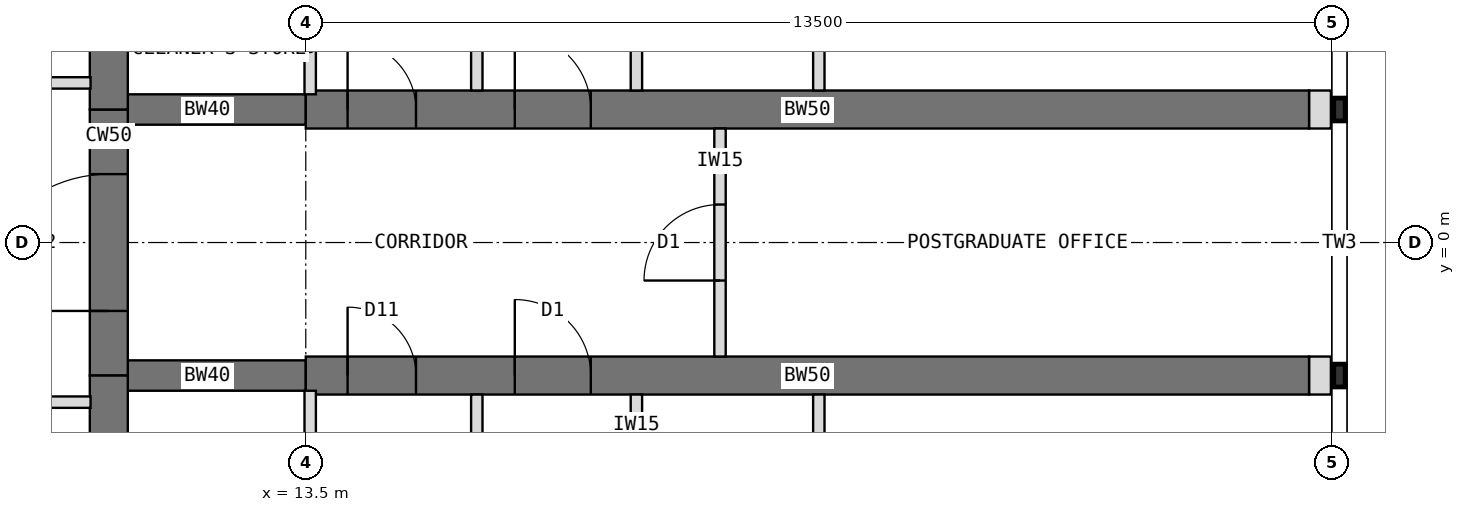
"""IFC4 building model, lengths in metres.
Left out: names, types, materials, properties, quantities, classifications, styles, units other than length and angle.
Written with IfcOpenShell. Run it as: python <this file> out.ifc"""

import sys

from ifc_helpers import new_model, si_unit, direction, frame, frame_2d, origin, place, context, subcontext, project, spatial, rectangle, extrude, element, fill, save


model = new_model("IFC4")
c1 = context("Model", 3, precision=1e-05, world=origin(), true_north=direction((0.0, 1.0)))
c2 = subcontext(c1, "Body", "Model", "MODEL_VIEW")
j1 = project(units=[si_unit("LENGTHUNIT", "METRE"), si_unit("PLANEANGLEUNIT", "RADIAN")], contexts=[c1])
p1 = place(None, origin())
s1 = spatial("IfcSite", under=j1, at=p1, CompositionType="ELEMENT")
p2 = place(p1, origin())
s2 = spatial("IfcBuilding", under=s1, at=p2, CompositionType="ELEMENT")
p3 = place(p2, frame((0.0, 0.0, 206.5)))
s3 = spatial("IfcBuildingStorey", under=s2, at=p3, CompositionType="ELEMENT", Elevation=206.5)
p4 = place(p3, frame((10.908, -6.298, 0.0), z_axis=(0.0, 0.0, 1.0), x_axis=(0.0, 1.0, 0.0)))
e1 = element("IfcWall", 1, at=p4, inside=s3, PredefinedType="SHEAR", context=c2, shape_type="SweptSolid", body=[
    extrude(rectangle(XDim=4.548, YDim=0.5, at=frame_2d((2.274, 0.0))), origin(), (0.0, 0.0, 1.0), 4.0),
])
p5 = place(p3, frame((10.908, -1.75, 0.0), z_axis=(0.0, 0.0, 1.0), x_axis=(0.0, 1.0, 0.0)))
e2 = element("IfcWall", 2, at=p5, inside=s3, PredefinedType="SHEAR", context=c2, shape_type="SweptSolid", body=[
    extrude(rectangle(XDim=3.5, YDim=0.5, at=frame_2d((1.75, 0.0))), origin(), (0.0, 0.0, 1.0), 4.0),
])
p6 = place(p5, frame((0.85, 0.0, 0.0)))
e3 = element("IfcOpeningElement", 3, at=p6, cuts=e2, PredefinedType="OPENING", context=c2, shape_type="SweptSolid", body=[
    extrude(rectangle(XDim=1.8, YDim=2.1, at=frame_2d((0.9, 1.05))), frame((0.0, 0.26, 0.0), z_axis=(0.0, -1.0, 0.0), x_axis=(1.0, 0.0, 0.0)), (0.0, 0.0, 1.0), 0.52),
])
p7 = place(p3, frame((10.908, 1.75, 0.0), z_axis=(0.0, 0.0, 1.0), x_axis=(0.0, 1.0, 0.0)))
e4 = element("IfcWall", 4, at=p7, inside=s3, PredefinedType="SHEAR", context=c2, shape_type="SweptSolid", body=[
    extrude(rectangle(XDim=4.548, YDim=0.5, at=frame_2d((2.274, 0.0))), origin(), (0.0, 0.0, 1.0), 4.0),
])
p8 = place(p3, frame((10.908, 1.75, 0.0), z_axis=(0.0, 0.0, 1.0), x_axis=(1.0, 0.0, 0.0)))
e5 = element("IfcWall", 5, at=p8, inside=s3, PredefinedType="SHEAR", context=c2, shape_type="SweptSolid", body=[
    extrude(rectangle(XDim=2.592, YDim=0.4, at=frame_2d((1.296, 0.0))), origin(), (0.0, 0.0, 1.0), 4.0),
])
p9 = place(p3, frame((13.5, 1.75, 0.0), z_axis=(0.0, 0.0, 1.0), x_axis=(1.0, 0.0, 0.0)))
e6 = element("IfcWall", 6, at=p9, inside=s3, PredefinedType="SHEAR", context=c2, shape_type="SweptSolid", body=[
    extrude(rectangle(XDim=13.2, YDim=0.5, at=frame_2d((6.6, 0.0))), origin(), (0.0, 0.0, 1.0), 4.0),
])
p10 = place(p9, frame((0.55, 0.0, 0.0)))
e7 = element("IfcOpeningElement", 7, at=p10, cuts=e6, PredefinedType="OPENING", context=c2, shape_type="SweptSolid", body=[
    extrude(rectangle(XDim=0.9, YDim=2.1, at=frame_2d((0.45, 1.05))), frame((0.0, 0.26, 0.0), z_axis=(0.0, -1.0, 0.0), x_axis=(1.0, 0.0, 0.0)), (0.0, 0.0, 1.0), 0.52),
])
p11 = place(p9, frame((2.75, 0.0, 0.0)))
e8 = element("IfcOpeningElement", 8, at=p11, cuts=e6, PredefinedType="OPENING", context=c2, shape_type="SweptSolid", body=[
    extrude(rectangle(XDim=1.0, YDim=2.1, at=frame_2d((0.5, 1.05))), frame((0.0, 0.26, 0.0), z_axis=(0.0, -1.0, 0.0), x_axis=(1.0, 0.0, 0.0)), (0.0, 0.0, 1.0), 0.52),
])
p12 = place(p3, frame((10.908, -1.75, 0.0), z_axis=(0.0, 0.0, 1.0), x_axis=(1.0, 0.0, 0.0)))
e9 = element("IfcWall", 9, at=p12, inside=s3, PredefinedType="SHEAR", context=c2, shape_type="SweptSolid", body=[
    extrude(rectangle(XDim=2.592, YDim=0.4, at=frame_2d((1.296, 0.0))), origin(), (0.0, 0.0, 1.0), 4.0),
])
p13 = place(p3, frame((13.5, -1.75, 0.0), z_axis=(0.0, 0.0, 1.0), x_axis=(1.0, 0.0, 0.0)))
e10 = element("IfcWall", 10, at=p13, inside=s3, PredefinedType="SHEAR", context=c2, shape_type="SweptSolid", body=[
    extrude(rectangle(XDim=13.2, YDim=0.5, at=frame_2d((6.6, 0.0))), origin(), (0.0, 0.0, 1.0), 4.0),
])
p14 = place(p13, frame((0.55, 0.0, 0.0)))
e11 = element("IfcOpeningElement", 11, at=p14, cuts=e10, PredefinedType="OPENING", context=c2, shape_type="SweptSolid", body=[
    extrude(rectangle(XDim=0.9, YDim=2.1, at=frame_2d((0.45, 1.05))), frame((0.0, 0.26, 0.0), z_axis=(0.0, -1.0, 0.0), x_axis=(1.0, 0.0, 0.0)), (0.0, 0.0, 1.0), 0.52),
])
p15 = place(p13, frame((2.75, 0.0, 0.0)))
e12 = element("IfcOpeningElement", 12, at=p15, cuts=e10, PredefinedType="OPENING", context=c2, shape_type="SweptSolid", body=[
    extrude(rectangle(XDim=1.0, YDim=2.1, at=frame_2d((0.5, 1.05))), frame((0.0, 0.26, 0.0), z_axis=(0.0, -1.0, 0.0), x_axis=(1.0, 0.0, 0.0)), (0.0, 0.0, 1.0), 0.52),
])
for number, where, z_axis, x_axis in (
    (13, (26.7, 1.75, 0.0), (0.0, 0.0, 1.0), (1.0, 0.0, 0.0)),
    (14, (26.7, -1.75, 0.0), (0.0, 0.0, 1.0), (1.0, 0.0, 0.0)),
):
    element("IfcWall", number, at=place(p3, frame(where, z_axis=z_axis, x_axis=x_axis)), inside=s3, PredefinedType="PARTITIONING", context=c2, shape_type="SweptSolid", body=[
        extrude(rectangle(XDim=0.288, YDim=0.5, at=frame_2d((0.144, 0.0))), origin(), (0.0, 0.0, 1.0), 3.8),
    ])
p16 = place(p3, frame((15.75, 2.0, 0.0), z_axis=(0.0, 0.0, 1.0), x_axis=(0.0, 1.0, 0.0)))
e15 = element("IfcWall", 15, at=p16, inside=s3, PredefinedType="PARTITIONING", context=c2, shape_type="SweptSolid", body=[
    extrude(rectangle(XDim=4.75, YDim=0.15, at=frame_2d((2.375, 0.0))), origin(), (0.0, 0.0, 1.0), 3.8),
])
p17 = place(p3, frame((20.25, 2.0, 0.0), z_axis=(0.0, 0.0, 1.0), x_axis=(0.0, 1.0, 0.0)))
e16 = element("IfcWall", 16, at=p17, inside=s3, PredefinedType="PARTITIONING", context=c2, shape_type="SweptSolid", body=[
    extrude(rectangle(XDim=4.75, YDim=0.15, at=frame_2d((2.375, 0.0))), origin(), (0.0, 0.0, 1.0), 3.8),
])
p18 = place(p17, frame((3.35, 0.0, 0.0)))
e17 = element("IfcOpeningElement", 17, at=p18, cuts=e16, PredefinedType="OPENING", context=c2, shape_type="SweptSolid", body=[
    extrude(rectangle(XDim=1.0, YDim=2.1, at=frame_2d((0.5, 1.05))), frame((0.0, 0.085, 0.0), z_axis=(0.0, -1.0, 0.0), x_axis=(1.0, 0.0, 0.0)), (0.0, 0.0, 1.0), 0.17),
])
p19 = place(p3, frame((17.85, 2.0, 0.0), z_axis=(0.0, 0.0, 1.0), x_axis=(0.0, 1.0, 0.0)))
e18 = element("IfcWall", 18, at=p19, inside=s3, PredefinedType="PARTITIONING", context=c2, shape_type="SweptSolid", body=[
    extrude(rectangle(XDim=2.4, YDim=0.15, at=frame_2d((1.2, 0.0))), origin(), (0.0, 0.0, 1.0), 3.8),
])
p20 = place(p19, frame((0.7, 0.0, 0.0)))
e19 = element("IfcOpeningElement", 19, at=p20, cuts=e18, PredefinedType="OPENING", context=c2, shape_type="SweptSolid", body=[
    extrude(rectangle(XDim=1.0, YDim=2.1, at=frame_2d((0.5, 1.05))), frame((0.0, 0.085, 0.0), z_axis=(0.0, -1.0, 0.0), x_axis=(1.0, 0.0, 0.0)), (0.0, 0.0, 1.0), 0.17),
])
p21 = place(p3, frame((13.558, 1.95, 0.0), z_axis=(0.0, 0.0, 1.0), x_axis=(0.0, 1.0, 0.0)))
e20 = element("IfcWall", 20, at=p21, inside=s3, PredefinedType="PARTITIONING", context=c2, shape_type="SweptSolid", body=[
    extrude(rectangle(XDim=1.2, YDim=0.15, at=frame_2d((0.6, 0.0))), origin(), (0.0, 0.0, 1.0), 3.267),
])
p22 = place(p3, frame((15.75, -2.0, 0.0), z_axis=(0.0, 0.0, 1.0), x_axis=(0.0, -1.0, 0.0)))
e21 = element("IfcWall", 21, at=p22, inside=s3, PredefinedType="PARTITIONING", context=c2, shape_type="SweptSolid", body=[
    extrude(rectangle(XDim=4.75, YDim=0.15, at=frame_2d((2.375, 0.0))), origin(), (0.0, 0.0, 1.0), 3.8),
])
p23 = place(p3, frame((20.25, -2.0, 0.0), z_axis=(0.0, 0.0, 1.0), x_axis=(0.0, -1.0, 0.0)))
e22 = element("IfcWall", 22, at=p23, inside=s3, PredefinedType="PARTITIONING", context=c2, shape_type="SweptSolid", body=[
    extrude(rectangle(XDim=4.75, YDim=0.15, at=frame_2d((2.375, 0.0))), origin(), (0.0, 0.0, 1.0), 3.8),
])
p24 = place(p23, frame((3.35, 0.0, 0.0)))
e23 = element("IfcOpeningElement", 23, at=p24, cuts=e22, PredefinedType="OPENING", context=c2, shape_type="SweptSolid", body=[
    extrude(rectangle(XDim=1.0, YDim=2.1, at=frame_2d((0.5, 1.05))), frame((0.0, 0.085, 0.0), z_axis=(0.0, -1.0, 0.0), x_axis=(1.0, 0.0, 0.0)), (0.0, 0.0, 1.0), 0.17),
])
p25 = place(p3, frame((17.85, -2.0, 0.0), z_axis=(0.0, 0.0, 1.0), x_axis=(0.0, -1.0, 0.0)))
e24 = element("IfcWall", 24, at=p25, inside=s3, PredefinedType="PARTITIONING", context=c2, shape_type="SweptSolid", body=[
    extrude(rectangle(XDim=2.4, YDim=0.15, at=frame_2d((1.2, 0.0))), origin(), (0.0, 0.0, 1.0), 3.8),
])
p26 = place(p25, frame((0.7, 0.0, 0.0)))
e25 = element("IfcOpeningElement", 25, at=p26, cuts=e24, PredefinedType="OPENING", context=c2, shape_type="SweptSolid", body=[
    extrude(rectangle(XDim=1.0, YDim=2.1, at=frame_2d((0.5, 1.05))), frame((0.0, 0.085, 0.0), z_axis=(0.0, -1.0, 0.0), x_axis=(1.0, 0.0, 0.0)), (0.0, 0.0, 1.0), 0.17),
])
p27 = place(p3, frame((13.558, -1.95, 0.0), z_axis=(0.0, 0.0, 1.0), x_axis=(0.0, -1.0, 0.0)))
e26 = element("IfcWall", 26, at=p27, inside=s3, PredefinedType="PARTITIONING", context=c2, shape_type="SweptSolid", body=[
    extrude(rectangle(XDim=3.2, YDim=0.15, at=frame_2d((1.6, 0.0))), origin(), (0.0, 0.0, 1.0), 3.267),
])
p28 = place(p3, frame((6.143, 2.1, 0.0), z_axis=(0.0, 0.0, 1.0), x_axis=(1.0, 0.0, 0.0)))
e27 = element("IfcWall", 27, at=p28, inside=s3, PredefinedType="PARTITIONING", context=c2, shape_type="SweptSolid", body=[
    extrude(rectangle(XDim=4.526, YDim=0.15, at=frame_2d((2.263, 0.0))), origin(), (0.0, 0.0, 1.0), 3.8),
])
p29 = place(p28, frame((0.858, 0.0, 0.0)))
e28 = element("IfcOpeningElement", 28, at=p29, cuts=e27, PredefinedType="OPENING", context=c2, shape_type="SweptSolid", body=[
    extrude(rectangle(XDim=1.0, YDim=2.1, at=frame_2d((0.5, 1.05))), frame((0.0, 0.085, 0.0), z_axis=(0.0, -1.0, 0.0), x_axis=(1.0, 0.0, 0.0)), (0.0, 0.0, 1.0), 0.17),
])
p30 = place(p3, frame((10.668, -2.1, 0.0), z_axis=(0.0, 0.0, 1.0), x_axis=(-1.0, 0.0, 0.0)))
e29 = element("IfcWall", 29, at=p30, inside=s3, PredefinedType="PARTITIONING", context=c2, shape_type="SweptSolid", body=[
    extrude(rectangle(XDim=4.526, YDim=0.15, at=frame_2d((2.263, 0.0))), origin(), (0.0, 0.0, 1.0), 3.8),
])
p31 = place(p30, frame((2.668, 0.0, 0.0)))
e30 = element("IfcOpeningElement", 30, at=p31, cuts=e29, PredefinedType="OPENING", context=c2, shape_type="SweptSolid", body=[
    extrude(rectangle(XDim=1.0, YDim=2.1, at=frame_2d((0.5, 1.05))), frame((0.0, 0.085, 0.0), z_axis=(0.0, -1.0, 0.0), x_axis=(1.0, 0.0, 0.0)), (0.0, 0.0, 1.0), 0.17),
])
p32 = place(p3, frame((18.95, -1.5, 0.0), z_axis=(0.0, 0.0, 1.0), x_axis=(0.0, 1.0, 0.0)))
e31 = element("IfcWall", 31, at=p32, inside=s3, PredefinedType="PARTITIONING", context=c2, shape_type="SweptSolid", body=[
    extrude(rectangle(XDim=3.0, YDim=0.15, at=frame_2d((1.5, 0.0))), origin(), (0.0, 0.0, 1.0), 3.8),
])
p33 = place(p32, frame((1.0, 0.0, 0.0)))
e32 = element("IfcOpeningElement", 32, at=p33, cuts=e31, PredefinedType="OPENING", context=c2, shape_type="SweptSolid", body=[
    extrude(rectangle(XDim=1.0, YDim=2.1, at=frame_2d((0.5, 1.05))), frame((0.0, 0.085, 0.0), z_axis=(0.0, -1.0, 0.0), x_axis=(1.0, 0.0, 0.0)), (0.0, 0.0, 1.0), 0.17),
])
p34 = place(p6, origin())
e33 = element("IfcDoor", 33, at=p34, inside=s3, OperationType="DOUBLE_DOOR_DOUBLE_SWING", PredefinedType="DOOR", context=c2, shape_type="SweptSolid", body=[
    extrude(rectangle(XDim=1.8, YDim=2.1, at=frame_2d((0.9, 1.05))), frame((0.0, 0.025, 0.0), z_axis=(0.0, -1.0, 0.0), x_axis=(1.0, 0.0, 0.0)), (0.0, 0.0, 1.0), 0.05),
])
fill(e3, e33)
p35 = place(p33, origin())
e34 = element("IfcDoor", 34, at=p35, inside=s3, OperationType="SINGLE_SWING_LEFT", PredefinedType="DOOR", context=c2, shape_type="SweptSolid", body=[
    extrude(rectangle(XDim=1.0, YDim=2.1, at=frame_2d((0.5, 1.05))), frame((0.0, 0.025, 0.0), z_axis=(0.0, -1.0, 0.0), x_axis=(1.0, 0.0, 0.0)), (0.0, 0.0, 1.0), 0.05),
])
fill(e32, e34)
p36 = place(p10, origin())
e35 = element("IfcDoor", 35, at=p36, inside=s3, OperationType="SINGLE_SWING_LEFT", PredefinedType="DOOR", context=c2, shape_type="SweptSolid", body=[
    extrude(rectangle(XDim=0.9, YDim=2.1, at=frame_2d((0.45, 1.05))), frame((0.0, 0.025, 0.0), z_axis=(0.0, -1.0, 0.0), x_axis=(1.0, 0.0, 0.0)), (0.0, 0.0, 1.0), 0.05),
])
fill(e7, e35)
p37 = place(p11, origin())
e36 = element("IfcDoor", 36, at=p37, inside=s3, OperationType="SINGLE_SWING_LEFT", PredefinedType="DOOR", context=c2, shape_type="SweptSolid", body=[
    extrude(rectangle(XDim=1.0, YDim=2.1, at=frame_2d((0.5, 1.05))), frame((0.0, 0.025, 0.0), z_axis=(0.0, -1.0, 0.0), x_axis=(1.0, 0.0, 0.0)), (0.0, 0.0, 1.0), 0.05),
])
fill(e8, e36)
p38 = place(p14, origin())
e37 = element("IfcDoor", 37, at=p38, inside=s3, OperationType="SINGLE_SWING_LEFT", PredefinedType="DOOR", context=c2, shape_type="SweptSolid", body=[
    extrude(rectangle(XDim=0.9, YDim=2.1, at=frame_2d((0.45, 1.05))), frame((0.0, 0.025, 0.0), z_axis=(0.0, -1.0, 0.0), x_axis=(1.0, 0.0, 0.0)), (0.0, 0.0, 1.0), 0.05),
])
fill(e11, e37)
p39 = place(p15, origin())
e38 = element("IfcDoor", 38, at=p39, inside=s3, OperationType="SINGLE_SWING_LEFT", PredefinedType="DOOR", context=c2, shape_type="SweptSolid", body=[
    extrude(rectangle(XDim=1.0, YDim=2.1, at=frame_2d((0.5, 1.05))), frame((0.0, 0.025, 0.0), z_axis=(0.0, -1.0, 0.0), x_axis=(1.0, 0.0, 0.0)), (0.0, 0.0, 1.0), 0.05),
])
fill(e12, e38)
save(model, sys.argv[1])
